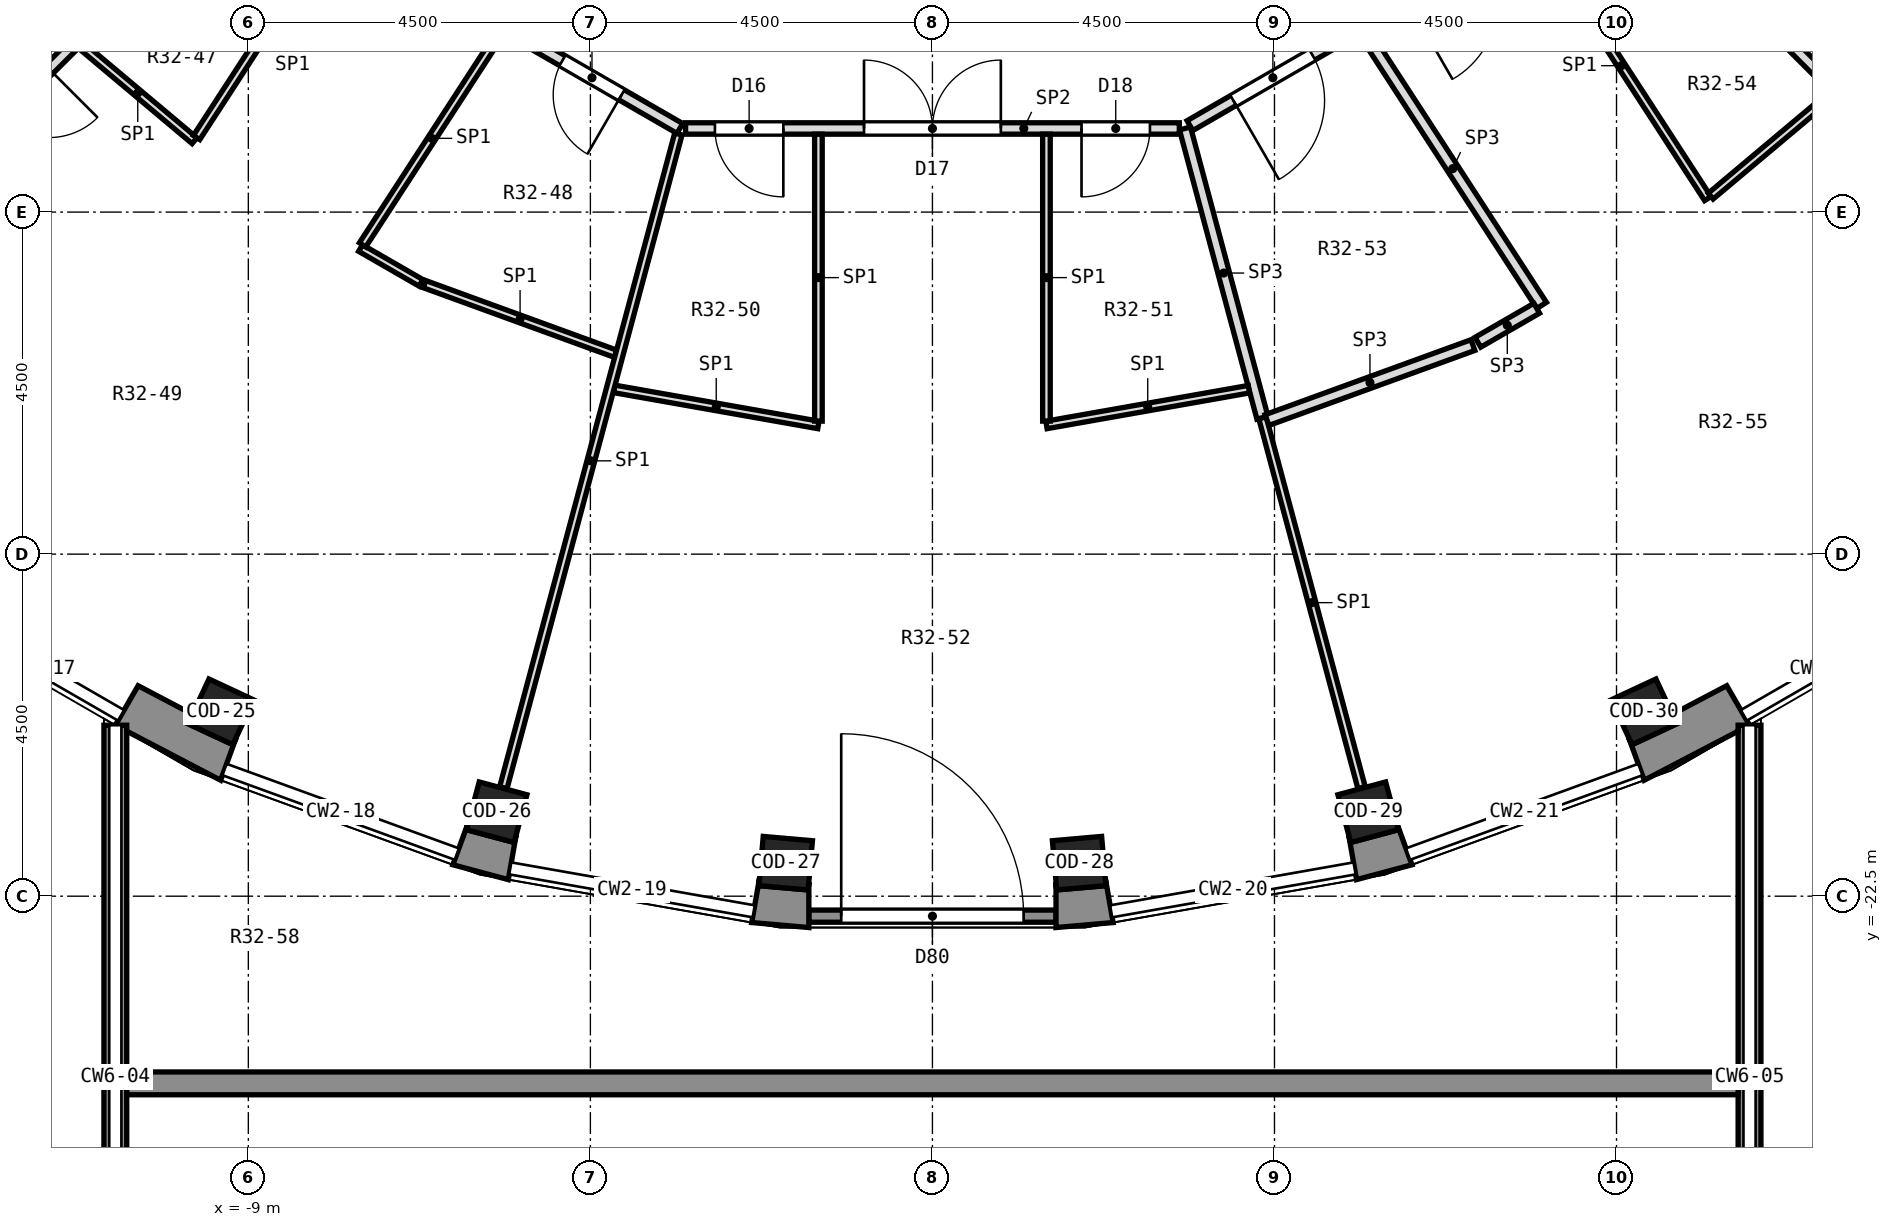
"""IFC4 building model, lengths in metres.
Left out: names, types, materials, properties, quantities, classifications, styles, units other than length and angle.
Written with IfcOpenShell. Run it as: python <this file> out.ifc"""

import sys

from ifc_helpers import new_model, si_unit, direction, frame, frame_2d, origin, origin_2d, place, context, subcontext, project, spatial, polyline, rectangle, outline, extrude, element, fill, save


model = new_model("IFC4")
c1 = context("Model", 3, precision=1e-05, world=origin(), true_north=direction((0.0, 1.0)))
c2 = subcontext(c1, "Body", "Model", "MODEL_VIEW")
j1 = project(units=[si_unit("LENGTHUNIT", "METRE"), si_unit("PLANEANGLEUNIT", "RADIAN")], contexts=[c1])
p1 = place(None, origin())
s1 = spatial("IfcSite", under=j1, at=p1, CompositionType="ELEMENT")
p2 = place(p1, origin())
s2 = spatial("IfcBuilding", under=s1, at=p2, CompositionType="ELEMENT")
p3 = place(p2, frame((0.0, 0.0, 224.7)))
s3 = spatial("IfcBuildingStorey", under=s2, at=p3, CompositionType="ELEMENT", Elevation=224.7)
for number, where, z_axis, x_axis in (
    (1, (-10.75, -29.512, 0.0), (0.0, 0.0, 1.0), (0.0, 1.0, 0.0)),
    (2, (10.75, -29.512, 0.0), (0.0, 0.0, 1.0), (0.0, 1.0, 0.0)),
):
    element("IfcWall", number, at=place(p3, frame(where, z_axis=z_axis, x_axis=x_axis)), inside=s3, PredefinedType="SOLIDWALL", context=c2, shape_type="SweptSolid", body=[
        extrude(rectangle(XDim=9.262, YDim=0.3, at=frame_2d((4.631, 0.0))), origin(), (0.0, 0.0, 1.0), 1.7),
    ])
for number, where, z_axis, x_axis in (
    (3, (-9.361, -20.075, -1.15), (0.0, 0.0, 1.0), (-0.423, -0.906, 0.0)),
    (4, (-5.733, -21.395, -1.15), (0.0, 0.0, 1.0), (-0.259, -0.966, 0.0)),
    (5, (-1.93, -22.066, -1.15), (0.0, 0.0, 1.0), (-0.087, -0.996, 0.0)),
    (6, (1.93, -22.066, -1.15), (0.0, 0.0, 1.0), (0.087, -0.996, 0.0)),
    (7, (5.733, -21.395, -1.15), (0.0, 0.0, 1.0), (0.259, -0.966, 0.0)),
    (8, (9.361, -20.075, -1.15), (0.0, 0.0, 1.0), (0.423, -0.906, 0.0)),
):
    element("IfcColumn", number, at=place(p3, frame(where, z_axis=z_axis, x_axis=x_axis)), inside=s3, PredefinedType="COLUMN", context=c2, shape_type="SweptSolid", body=[
        extrude(rectangle(XDim=0.65, YDim=0.65, at=origin_2d()), origin(), (0.0, 0.0, 1.0), 6.15),
    ])
p4 = place(p3, frame((-1.626, -22.762, 0.0), z_axis=(0.0, 0.0, 1.0), x_axis=(1.0, 0.0, 0.0)))
e9 = element("IfcWall", 9, at=p4, inside=s3, PredefinedType="SOLIDWALL", context=c2, shape_type="SweptSolid", body=[
    extrude(rectangle(XDim=3.251, YDim=0.16, at=frame_2d((1.626, 0.0))), origin(), (0.0, 0.0, 1.0), 4.6),
])
p5 = place(p4, frame((0.426, 0.0, 0.0)))
e10 = element("IfcOpeningElement", 10, at=p5, cuts=e9, PredefinedType="OPENING", context=c2, shape_type="SweptSolid", body=[
    extrude(rectangle(XDim=2.4, YDim=2.1, at=frame_2d((1.2, 1.05))), frame((0.0, 0.092, 0.0), z_axis=(0.0, -1.0, 0.0), x_axis=(1.0, 0.0, 0.0)), (0.0, 0.0, 1.0), 0.184),
])
p6 = place(p3, origin())
e11 = element("IfcWall", 11, at=p6, inside=s3, PredefinedType="SOLIDWALL", context=c2, shape_type="SweptSolid", body=[
    extrude(outline(polyline([(-10.45, -19.731), (-10.75, -20.25), (-10.6, -20.25), (-10.6, -20.329), (-9.364, -20.975), (-9.159, -20.411), (-9.204, -20.507), (-9.793, -20.232), (-9.735, -20.107), (-10.45, -19.731)])), origin(), (0.0, 0.0, 1.0), 4.6),
])
p7 = place(p3, origin())
e12 = element("IfcWall", 12, at=p7, inside=s3, PredefinedType="SOLIDWALL", context=c2, shape_type="SweptSolid", body=[
    extrude(outline(polyline([(-5.58, -22.282), (-5.476, -21.691), (-5.503, -21.793), (-6.131, -21.625), (-6.104, -21.523), (-6.309, -22.087), (-5.58, -22.282)])), origin(), (0.0, 0.0, 1.0), 4.6),
])
p8 = place(p3, origin())
e13 = element("IfcWall", 13, at=p8, inside=s3, PredefinedType="SOLIDWALL", context=c2, shape_type="SweptSolid", body=[
    extrude(outline(polyline([(-2.378, -22.847), (-1.626, -22.913), (-1.626, -22.312), (-1.635, -22.418), (-2.283, -22.361), (-2.273, -22.256), (-2.378, -22.847)])), origin(), (0.0, 0.0, 1.0), 4.6),
])
p9 = place(p3, origin())
e14 = element("IfcWall", 14, at=p9, inside=s3, PredefinedType="SOLIDWALL", context=c2, shape_type="SweptSolid", body=[
    extrude(outline(polyline([(1.626, -22.913), (2.378, -22.847), (2.273, -22.256), (2.283, -22.361), (1.635, -22.418), (1.626, -22.312), (1.626, -22.913)])), origin(), (0.0, 0.0, 1.0), 4.6),
])
p10 = place(p3, origin())
e15 = element("IfcWall", 15, at=p10, inside=s3, PredefinedType="SOLIDWALL", context=c2, shape_type="SweptSolid", body=[
    extrude(outline(polyline([(6.309, -22.087), (6.104, -21.523), (6.131, -21.625), (5.503, -21.793), (5.476, -21.691), (5.58, -22.282), (6.309, -22.087)])), origin(), (0.0, 0.0, 1.0), 4.6),
])
p11 = place(p3, origin())
e16 = element("IfcWall", 16, at=p11, inside=s3, PredefinedType="SOLIDWALL", context=c2, shape_type="SweptSolid", body=[
    extrude(outline(polyline([(9.159, -20.411), (9.364, -20.975), (10.6, -20.329), (10.6, -20.25), (10.75, -20.25), (10.45, -19.731), (9.735, -20.107), (9.793, -20.232), (9.204, -20.507), (9.159, -20.411)])), origin(), (0.0, 0.0, 1.0), 4.6),
])
p12 = place(p3, frame((4.342, -16.205, 0.0), z_axis=(0.0, 0.0, 1.0), x_axis=(0.258748195279, -0.965944807657, 0.0)))
e17 = element("IfcWall", 17, at=p12, inside=s3, PredefinedType="PARTITIONING", context=c2, shape_type="SweptSolid", body=[
    extrude(rectangle(XDim=5.039, YDim=0.1, at=frame_2d((2.519, 0.0))), origin(), (0.0, 0.0, 1.0), 4.6),
])
p13 = place(p3, frame((3.323, -12.4, 0.0), z_axis=(0.0, 0.0, 1.0), x_axis=(0.258646238559, -0.965972113096, 0.0)))
e18 = element("IfcWall", 18, at=p13, inside=s3, PredefinedType="PARTITIONING", context=c2, shape_type="SweptSolid", body=[
    extrude(rectangle(XDim=3.939, YDim=0.15, at=frame_2d((1.969, 0.0))), origin(), (0.0, 0.0, 1.0), 4.6),
])
p14 = place(p3, frame((5.676, -11.128, 0.0), z_axis=(0.0, 0.0, 1.0), x_axis=(0.544832434593, -0.838544941083, 0.0)))
e19 = element("IfcWall", 19, at=p14, inside=s3, PredefinedType="PARTITIONING", context=c2, shape_type="SweptSolid", body=[
    extrude(rectangle(XDim=4.293, YDim=0.15, at=frame_2d((2.146, 0.0))), origin(), (0.0, 0.0, 1.0), 4.6),
])
p15 = place(p3, frame((7.931, -9.826, 0.0), z_axis=(0.0, 0.0, 1.0), x_axis=(0.544576550515, -0.838711142545, 0.0)))
e20 = element("IfcWall", 20, at=p15, inside=s3, PredefinedType="PARTITIONING", context=c2, shape_type="SweptSolid", body=[
    extrude(rectangle(XDim=4.168, YDim=0.1, at=frame_2d((2.084, 0.0))), origin(), (0.0, 0.0, 1.0), 4.6),
])
p16 = place(p3, frame((9.077, -9.077, 0.0), z_axis=(0.0, 0.0, 1.0), x_axis=(0.707106781187, -0.707106781187, 0.0)))
e21 = element("IfcWall", 21, at=p16, inside=s3, PredefinedType="PARTITIONING", context=c2, shape_type="SweptSolid", body=[
    extrude(rectangle(XDim=5.852, YDim=0.15, at=frame_2d((2.926, 0.0))), origin(), (0.0, 0.0, 1.0), 4.6),
])
p17 = place(p16, frame((1.545, 0.0, 0.0)))
e22 = element("IfcOpeningElement", 22, at=p17, cuts=e21, PredefinedType="OPENING", context=c2, shape_type="SweptSolid", body=[
    extrude(rectangle(XDim=0.9, YDim=2.1, at=frame_2d((0.45, 1.05))), frame((0.0, 0.087, 0.0), z_axis=(0.0, -1.0, 0.0), x_axis=(1.0, 0.0, 0.0)), (0.0, 0.0, 1.0), 0.174),
])
p18 = place(p3, frame((-11.202, -11.307, 0.0), z_axis=(0.0, 0.0, 1.0), x_axis=(0.765897191843, -0.642963056114, 0.0)))
e23 = element("IfcWall", 23, at=p18, inside=s3, PredefinedType="PARTITIONING", context=c2, shape_type="SweptSolid", body=[
    extrude(rectangle(XDim=1.95, YDim=0.1, at=frame_2d((0.975, 0.0))), origin(), (0.0, 0.0, 1.0), 4.6),
])
p19 = place(p3, frame((-9.077, -9.077, 0.0), z_axis=(0.0, 0.0, 1.0), x_axis=(0.865961614908, -0.500110469302, 0.0)))
e24 = element("IfcWall", 24, at=p19, inside=s3, PredefinedType="PARTITIONING", context=c2, shape_type="SweptSolid", body=[
    extrude(rectangle(XDim=6.645, YDim=0.15, at=frame_2d((3.322, 0.0))), origin(), (0.0, 0.0, 1.0), 4.6),
])
p20 = place(p19, frame((4.86, 0.0, 0.0)))
e25 = element("IfcOpeningElement", 25, at=p20, cuts=e24, PredefinedType="OPENING", context=c2, shape_type="SweptSolid", body=[
    extrude(rectangle(XDim=0.9, YDim=2.1, at=frame_2d((0.45, 1.05))), frame((0.0, 0.087, 0.0), z_axis=(0.0, -1.0, 0.0), x_axis=(1.0, 0.0, 0.0)), (0.0, 0.0, 1.0), 0.174),
])
p21 = place(p3, frame((-7.524, -13.973, 0.0), z_axis=(0.0, 0.0, 1.0), x_axis=(0.866468987099, -0.499230902886, 0.0)))
e26 = element("IfcWall", 26, at=p21, inside=s3, PredefinedType="PARTITIONING", context=c2, shape_type="SweptSolid", body=[
    extrude(rectangle(XDim=0.917, YDim=0.1, at=frame_2d((0.459, 0.0))), origin(), (0.0, 0.0, 1.0), 4.6),
])
p22 = place(p3, frame((-6.682, -14.448, 0.0), z_axis=(0.0, 0.0, 1.0), x_axis=(0.939569433945, -0.34235840693, 0.0)))
e27 = element("IfcWall", 27, at=p22, inside=s3, PredefinedType="PARTITIONING", context=c2, shape_type="SweptSolid", body=[
    extrude(rectangle(XDim=2.676, YDim=0.1, at=frame_2d((1.338, 0.0))), origin(), (0.0, 0.0, 1.0), 4.6),
])
p23 = place(p3, frame((-4.189, -15.826, 0.0), z_axis=(0.0, 0.0, 1.0), x_axis=(0.984790759644, -0.173744524288, 0.0)))
e28 = element("IfcWall", 28, at=p23, inside=s3, PredefinedType="PARTITIONING", context=c2, shape_type="SweptSolid", body=[
    extrude(rectangle(XDim=2.73, YDim=0.1, at=frame_2d((1.365, 0.0))), origin(), (0.0, 0.0, 1.0), 4.6),
])
p24 = place(p3, frame((-3.248, -12.4, 0.0), z_axis=(0.0, 0.0, 1.0), x_axis=(1.0, 0.0, 0.0)))
e29 = element("IfcWall", 29, at=p24, inside=s3, PredefinedType="PARTITIONING", context=c2, shape_type="SweptSolid", body=[
    extrude(rectangle(XDim=6.496, YDim=0.15, at=frame_2d((3.248, 0.0))), origin(), (0.0, 0.0, 1.0), 4.6),
])
p25 = place(p24, frame((0.386, 0.0, 0.0)))
e30 = element("IfcOpeningElement", 30, at=p25, cuts=e29, PredefinedType="OPENING", context=c2, shape_type="SweptSolid", body=[
    extrude(rectangle(XDim=0.9, YDim=2.1, at=frame_2d((0.45, 1.05))), frame((0.0, 0.087, 0.0), z_axis=(0.0, -1.0, 0.0), x_axis=(1.0, 0.0, 0.0)), (0.0, 0.0, 1.0), 0.174),
])
p26 = place(p24, frame((2.348, 0.0, 0.0)))
e31 = element("IfcOpeningElement", 31, at=p26, cuts=e29, PredefinedType="OPENING", context=c2, shape_type="SweptSolid", body=[
    extrude(rectangle(XDim=1.8, YDim=2.1, at=frame_2d((0.9, 1.05))), frame((0.0, 0.087, 0.0), z_axis=(0.0, -1.0, 0.0), x_axis=(1.0, 0.0, 0.0)), (0.0, 0.0, 1.0), 0.174),
])
p27 = place(p24, frame((5.209, 0.0, 0.0)))
e32 = element("IfcOpeningElement", 32, at=p27, cuts=e29, PredefinedType="OPENING", context=c2, shape_type="SweptSolid", body=[
    extrude(rectangle(XDim=0.9, YDim=2.1, at=frame_2d((0.45, 1.05))), frame((0.0, 0.087, 0.0), z_axis=(0.0, -1.0, 0.0), x_axis=(1.0, 0.0, 0.0)), (0.0, 0.0, 1.0), 0.174),
])
p28 = place(p3, frame((1.5, -16.3, 0.0), z_axis=(0.0, 0.0, 1.0), x_axis=(0.98479355117, 0.173728701063, 0.0)))
e33 = element("IfcWall", 33, at=p28, inside=s3, PredefinedType="PARTITIONING", context=c2, shape_type="SweptSolid", body=[
    extrude(rectangle(XDim=2.705, YDim=0.1, at=frame_2d((1.353, 0.0))), origin(), (0.0, 0.0, 1.0), 4.6),
])
p29 = place(p3, frame((4.402, -16.236, 0.0), z_axis=(0.0, 0.0, 1.0), x_axis=(0.939709324203, 0.341974247578, 0.0)))
e34 = element("IfcWall", 34, at=p29, inside=s3, PredefinedType="PARTITIONING", context=c2, shape_type="SweptSolid", body=[
    extrude(rectangle(XDim=2.883, YDim=0.15, at=frame_2d((1.441, 0.0))), origin(), (0.0, 0.0, 1.0), 4.6),
])
p30 = place(p3, frame((7.176, -15.212, 0.0), z_axis=(0.0, 0.0, 1.0), x_axis=(0.866067377925, 0.499927291608, 0.0)))
e35 = element("IfcWall", 35, at=p30, inside=s3, PredefinedType="PARTITIONING", context=c2, shape_type="SweptSolid", body=[
    extrude(rectangle(XDim=0.894, YDim=0.15, at=frame_2d((0.447, 0.0))), origin(), (0.0, 0.0, 1.0), 4.6),
])
p31 = place(p3, frame((3.388, -12.363, 0.0), z_axis=(0.0, 0.0, 1.0), x_axis=(0.865967095912, 0.5001009786, 0.0)))
e36 = element("IfcWall", 36, at=p31, inside=s3, PredefinedType="PARTITIONING", context=c2, shape_type="SweptSolid", body=[
    extrude(rectangle(XDim=6.495, YDim=0.15, at=frame_2d((3.248, 0.0))), origin(), (0.0, 0.0, 1.0), 4.6),
])
p32 = place(p31, frame((0.66, 0.0, 0.0)))
e37 = element("IfcOpeningElement", 37, at=p32, cuts=e36, PredefinedType="OPENING", context=c2, shape_type="SweptSolid", body=[
    extrude(rectangle(XDim=1.2, YDim=2.1, at=frame_2d((0.6, 1.05))), frame((0.0, 0.087, 0.0), z_axis=(0.0, -1.0, 0.0), x_axis=(1.0, 0.0, 0.0)), (0.0, 0.0, 1.0), 0.174),
])
p33 = place(p31, frame((3.297, 0.0, 0.0)))
e38 = element("IfcOpeningElement", 38, at=p33, cuts=e36, PredefinedType="OPENING", context=c2, shape_type="SweptSolid", body=[
    extrude(rectangle(XDim=1.2, YDim=2.1, at=frame_2d((0.6, 1.05))), frame((0.0, 0.087, 0.0), z_axis=(0.0, -1.0, 0.0), x_axis=(1.0, 0.0, 0.0)), (0.0, 0.0, 1.0), 0.174),
])
p34 = place(p3, frame((10.239, -13.29, 0.0), z_axis=(0.0, 0.0, 1.0), x_axis=(0.766082082368, 0.642742750308, 0.0)))
e39 = element("IfcWall", 39, at=p34, inside=s3, PredefinedType="PARTITIONING", context=c2, shape_type="SweptSolid", body=[
    extrude(rectangle(XDim=2.09, YDim=0.1, at=frame_2d((1.045, 0.0))), origin(), (0.0, 0.0, 1.0), 4.6),
])
p35 = place(p3, frame((-13.215, -13.215, 0.0), z_axis=(0.0, 0.0, 1.0), x_axis=(0.707106781187, 0.707106781187, 0.0)))
e40 = element("IfcWall", 40, at=p35, inside=s3, PredefinedType="PARTITIONING", context=c2, shape_type="SweptSolid", body=[
    extrude(rectangle(XDim=5.777, YDim=0.15, at=frame_2d((2.888, 0.0))), origin(), (0.0, 0.0, 1.0), 4.6),
])
p36 = place(p35, frame((3.859, 0.0, 0.0)))
e41 = element("IfcOpeningElement", 41, at=p36, cuts=e40, PredefinedType="OPENING", context=c2, shape_type="SweptSolid", body=[
    extrude(rectangle(XDim=0.9, YDim=2.1, at=frame_2d((0.45, 1.05))), frame((0.0, 0.087, 0.0), z_axis=(0.0, -1.0, 0.0), x_axis=(1.0, 0.0, 0.0)), (0.0, 0.0, 1.0), 0.174),
])
p37 = place(p35, frame((0.456, 0.0, 0.0)))
e42 = element("IfcOpeningElement", 42, at=p37, cuts=e40, PredefinedType="OPENING", context=c2, shape_type="SweptSolid", body=[
    extrude(rectangle(XDim=1.8, YDim=2.1, at=frame_2d((0.9, 1.05))), frame((0.0, 0.087, 0.0), z_axis=(0.0, -1.0, 0.0), x_axis=(1.0, 0.0, 0.0)), (0.0, 0.0, 1.0), 0.174),
])
p38 = place(p3, frame((-7.497, -13.931, 0.0), z_axis=(0.0, 0.0, 1.0), x_axis=(0.54476755827, 0.838587089966, 0.0)))
e43 = element("IfcWall", 43, at=p38, inside=s3, PredefinedType="PARTITIONING", context=c2, shape_type="SweptSolid", body=[
    extrude(rectangle(XDim=3.343, YDim=0.1, at=frame_2d((1.671, 0.0))), origin(), (0.0, 0.0, 1.0), 4.6),
])
p39 = place(p3, frame((-9.681, -12.519, 0.0), z_axis=(0.0, 0.0, 1.0), x_axis=(0.544873455053, 0.838518287206, 0.0)))
e44 = element("IfcWall", 44, at=p39, inside=s3, PredefinedType="PARTITIONING", context=c2, shape_type="SweptSolid", body=[
    extrude(rectangle(XDim=3.212, YDim=0.1, at=frame_2d((1.606, 0.0))), origin(), (0.0, 0.0, 1.0), 4.6),
])
p40 = place(p3, frame((-5.645, -21.072, 0.0), z_axis=(0.0, 0.0, 1.0), x_axis=(0.258659321195, 0.965968610028, 0.0)))
e45 = element("IfcWall", 45, at=p40, inside=s3, PredefinedType="PARTITIONING", context=c2, shape_type="SweptSolid", body=[
    extrude(rectangle(XDim=8.903, YDim=0.1, at=frame_2d((4.451, 0.0))), origin(), (0.0, 0.0, 1.0), 4.6),
])
for number, where, z_axis, x_axis in (
    (46, (1.5, -16.25, 0.0), (0.0, 0.0, 1.0), (0.0, 1.0, 0.0)),
    (47, (-1.5, -16.25, 0.0), (0.0, 0.0, 1.0), (0.0, 1.0, 0.0)),
):
    element("IfcWall", number, at=place(p3, frame(where, z_axis=z_axis, x_axis=x_axis)), inside=s3, PredefinedType="PARTITIONING", context=c2, shape_type="SweptSolid", body=[
        extrude(rectangle(XDim=3.775, YDim=0.1, at=frame_2d((1.887, 0.0))), origin(), (0.0, 0.0, 1.0), 4.6),
    ])
p41 = place(p3, frame((-10.6, -24.962, 0.0), z_axis=(0.0, 0.0, 1.0), x_axis=(1.0, 0.0, 0.0)))
e48 = element("IfcWall", 48, at=p41, inside=s3, PredefinedType="SOLIDWALL", context=c2, shape_type="SweptSolid", body=[
    extrude(rectangle(XDim=21.2, YDim=0.3, at=frame_2d((10.6, 0.0))), origin(), (0.0, 0.0, 1.0), 1.7),
])
p42 = place(p5, origin())
e49 = element("IfcDoor", 49, at=p42, inside=s3, OperationType="SINGLE_SWING_LEFT", PredefinedType="DOOR", context=c2, shape_type="SweptSolid", body=[
    extrude(rectangle(XDim=2.4, YDim=2.1, at=frame_2d((1.2, 1.05))), frame((0.0, 0.025, 0.0), z_axis=(0.0, -1.0, 0.0), x_axis=(1.0, 0.0, 0.0)), (0.0, 0.0, 1.0), 0.05),
])
fill(e10, e49)
p43 = place(p20, frame((0.9, 0.0, 0.0), z_axis=(0.0, 0.0, 1.0), x_axis=(-1.0, 0.0, 0.0)))
e50 = element("IfcDoor", 50, at=p43, inside=s3, OperationType="SINGLE_SWING_LEFT", PredefinedType="DOOR", context=c2, shape_type="SweptSolid", body=[
    extrude(rectangle(XDim=0.9, YDim=2.1, at=frame_2d((0.45, 1.05))), frame((0.0, 0.025, 0.0), z_axis=(0.0, -1.0, 0.0), x_axis=(1.0, 0.0, 0.0)), (0.0, 0.0, 1.0), 0.05),
])
fill(e25, e50)
p44 = place(p25, frame((0.9, 0.0, 0.0), z_axis=(0.0, 0.0, 1.0), x_axis=(-1.0, 0.0, 0.0)))
e51 = element("IfcDoor", 51, at=p44, inside=s3, OperationType="SINGLE_SWING_LEFT", PredefinedType="DOOR", context=c2, shape_type="SweptSolid", body=[
    extrude(rectangle(XDim=0.9, YDim=2.1, at=frame_2d((0.45, 1.05))), frame((0.0, 0.025, 0.0), z_axis=(0.0, -1.0, 0.0), x_axis=(1.0, 0.0, 0.0)), (0.0, 0.0, 1.0), 0.05),
])
fill(e30, e51)
p45 = place(p26, origin())
e52 = element("IfcDoor", 52, at=p45, inside=s3, OperationType="DOUBLE_DOOR_SINGLE_SWING", PredefinedType="DOOR", context=c2, shape_type="SweptSolid", body=[
    extrude(rectangle(XDim=1.8, YDim=2.1, at=frame_2d((0.9, 1.05))), frame((0.0, 0.025, 0.0), z_axis=(0.0, -1.0, 0.0), x_axis=(1.0, 0.0, 0.0)), (0.0, 0.0, 1.0), 0.05),
])
fill(e31, e52)
p46 = place(p27, frame((0.9, 0.0, 0.0), z_axis=(0.0, 0.0, 1.0), x_axis=(-1.0, 0.0, 0.0)))
e53 = element("IfcDoor", 53, at=p46, inside=s3, OperationType="SINGLE_SWING_RIGHT", PredefinedType="DOOR", context=c2, shape_type="SweptSolid", body=[
    extrude(rectangle(XDim=0.9, YDim=2.1, at=frame_2d((0.45, 1.05))), frame((0.0, 0.025, 0.0), z_axis=(0.0, -1.0, 0.0), x_axis=(1.0, 0.0, 0.0)), (0.0, 0.0, 1.0), 0.05),
])
fill(e32, e53)
p47 = place(p32, frame((1.2, 0.0, 0.0), z_axis=(0.0, 0.0, 1.0), x_axis=(-1.0, 0.0, 0.0)))
e54 = element("IfcDoor", 54, at=p47, inside=s3, OperationType="SINGLE_SWING_RIGHT", PredefinedType="DOOR", context=c2, shape_type="SweptSolid", body=[
    extrude(rectangle(XDim=1.2, YDim=2.1, at=frame_2d((0.6, 1.05))), frame((0.0, 0.025, 0.0), z_axis=(0.0, -1.0, 0.0), x_axis=(1.0, 0.0, 0.0)), (0.0, 0.0, 1.0), 0.05),
])
fill(e37, e54)
save(model, sys.argv[1])
